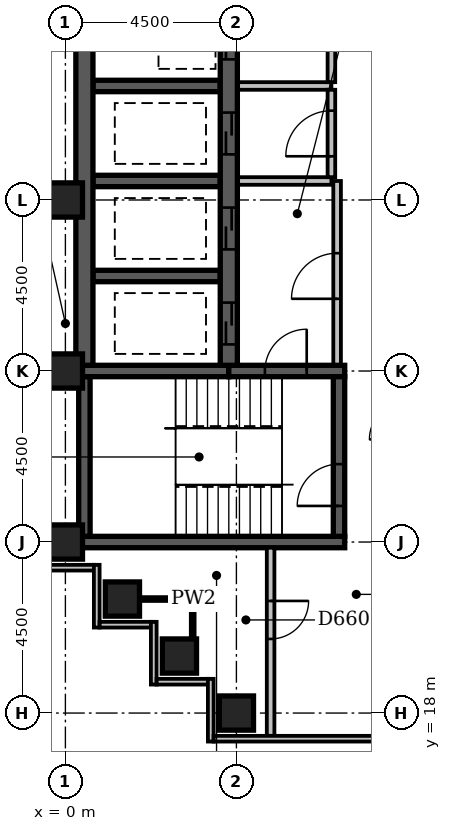
"""IFC4 building model, lengths in metres.
Left out: names, types, materials, properties, quantities, classifications, styles, units other than length and angle.
Written with IfcOpenShell. Run it as: python <this file> out.ifc"""

import sys

from ifc_helpers import new_model, si_unit, direction, frame, frame_2d, origin, origin_2d, place, context, subcontext, project, spatial, rectangle, extrude, element, fill, save


model = new_model("IFC4")
c1 = context("Model", 3, precision=1e-05, world=origin(), true_north=direction((0.0, 1.0)))
c2 = subcontext(c1, "Body", "Model", "MODEL_VIEW")
j1 = project(units=[si_unit("LENGTHUNIT", "METRE"), si_unit("PLANEANGLEUNIT", "RADIAN")], contexts=[c1])
p1 = place(None, origin())
s1 = spatial("IfcSite", under=j1, at=p1, CompositionType="ELEMENT")
p2 = place(p1, origin())
s2 = spatial("IfcBuilding", under=s1, at=p2, CompositionType="ELEMENT")
p3 = place(p2, frame((0.0, 0.0, 254.6)))
s3 = spatial("IfcBuildingStorey", under=s2, at=p3, CompositionType="ELEMENT", Elevation=254.6)
p4 = place(p3, frame((0.35, 22.5, -0.3), z_axis=(0.0, 0.0, 1.0), x_axis=(1.0, 0.0, 0.0)))
e1 = element("IfcWall", 1, at=p4, inside=s3, PredefinedType="SHEAR", context=c2, shape_type="SweptSolid", body=[
    extrude(rectangle(XDim=7.0, YDim=0.3, at=frame_2d((3.5, 0.0))), origin(), (0.0, 0.0, 1.0), 3.45),
])
p5 = place(p3, frame((0.35, 27.0, -0.3), z_axis=(0.0, 0.0, 1.0), x_axis=(1.0, 0.0, 0.0)))
e2 = element("IfcWall", 2, at=p5, inside=s3, PredefinedType="SHEAR", context=c2, shape_type="SweptSolid", body=[
    extrude(rectangle(XDim=3.95, YDim=0.3, at=frame_2d((1.975, 0.0))), origin(), (0.0, 0.0, 1.0), 3.45),
])
p6 = place(p3, frame((0.5, 22.65, -0.3), z_axis=(0.0, 0.0, 1.0), x_axis=(0.0, 1.0, 0.0)))
e3 = element("IfcWall", 3, at=p6, inside=s3, PredefinedType="SHEAR", context=c2, shape_type="SweptSolid", body=[
    extrude(rectangle(XDim=4.2, YDim=0.3, at=frame_2d((2.1, 0.0))), origin(), (0.0, 0.0, 1.0), 3.45),
])
p7 = place(p3, frame((0.5, 27.15, -0.3), z_axis=(0.0, 0.0, 1.0), x_axis=(0.0, 1.0, 0.0)))
e4 = element("IfcWall", 4, at=p7, inside=s3, PredefinedType="SHEAR", context=c2, shape_type="SweptSolid", body=[
    extrude(rectangle(XDim=22.125, YDim=0.45, at=frame_2d((11.062, 0.0))), origin(), (0.0, 0.0, 1.0), 3.45),
])
for number, where, z_axis, x_axis in (
    (5, (0.725, 29.5, -0.3), (0.0, 0.0, 1.0), (1.0, 0.0, 0.0)),
    (6, (0.725, 32.0, -0.3), (0.0, 0.0, 1.0), (1.0, 0.0, 0.0)),
    (7, (0.725, 34.5, -0.3), (0.0, 0.0, 1.0), (1.0, 0.0, 0.0)),
):
    element("IfcWall", number, at=place(p3, frame(where, z_axis=z_axis, x_axis=x_axis)), inside=s3, PredefinedType="SHEAR", context=c2, shape_type="SweptSolid", body=[
        extrude(rectangle(XDim=3.35, YDim=0.3, at=frame_2d((1.675, 0.0))), origin(), (0.0, 0.0, 1.0), 3.45),
    ])
p8 = place(p3, frame((4.3, 27.0, -0.3), z_axis=(0.0, 0.0, 1.0), x_axis=(1.0, 0.0, 0.0)))
e8 = element("IfcWall", 8, at=p8, inside=s3, PredefinedType="SHEAR", context=c2, shape_type="SweptSolid", body=[
    extrude(rectangle(XDim=3.05, YDim=0.3, at=frame_2d((1.525, 0.0))), origin(), (0.0, 0.0, 1.0), 3.45),
])
p9 = place(p8, frame((0.95, 0.0, 0.3)))
e9 = element("IfcOpeningElement", 9, at=p9, cuts=e8, PredefinedType="OPENING", context=c2, shape_type="SweptSolid", body=[
    extrude(rectangle(XDim=1.1, YDim=2.1, at=frame_2d((0.55, 1.05))), frame((0.0, 0.162, 0.0), z_axis=(0.0, -1.0, 0.0), x_axis=(1.0, 0.0, 0.0)), (0.0, 0.0, 1.0), 0.324),
])
p10 = place(p3, frame((4.3, 27.15, -0.3), z_axis=(0.0, 0.0, 1.0), x_axis=(0.0, 1.0, 0.0)))
e10 = element("IfcWall", 10, at=p10, inside=s3, PredefinedType="SHEAR", context=c2, shape_type="SweptSolid", body=[
    extrude(rectangle(XDim=22.125, YDim=0.45, at=frame_2d((11.062, 0.0))), origin(), (0.0, 0.0, 1.0), 3.45),
])
p11 = place(p10, frame((3.05, 0.0, 0.3)))
e11 = element("IfcOpeningElement", 11, at=p11, cuts=e10, PredefinedType="OPENING", context=c2, shape_type="SweptSolid", body=[
    extrude(rectangle(XDim=1.1, YDim=2.1, at=frame_2d((0.55, 1.05))), frame((0.0, 0.237, 0.0), z_axis=(0.0, -1.0, 0.0), x_axis=(1.0, 0.0, 0.0)), (0.0, 0.0, 1.0), 0.474),
])
p12 = place(p10, frame((0.55, 0.0, 0.3)))
e12 = element("IfcOpeningElement", 12, at=p12, cuts=e10, PredefinedType="OPENING", context=c2, shape_type="SweptSolid", body=[
    extrude(rectangle(XDim=1.1, YDim=2.1, at=frame_2d((0.55, 1.05))), frame((0.0, 0.237, 0.0), z_axis=(0.0, -1.0, 0.0), x_axis=(1.0, 0.0, 0.0)), (0.0, 0.0, 1.0), 0.474),
])
p13 = place(p10, frame((20.55, 0.0, 0.3)))
e13 = element("IfcOpeningElement", 13, at=p13, cuts=e10, PredefinedType="OPENING", context=c2, shape_type="SweptSolid", body=[
    extrude(rectangle(XDim=1.1, YDim=2.1, at=frame_2d((0.55, 1.05))), frame((0.0, 0.237, 0.0), z_axis=(0.0, -1.0, 0.0), x_axis=(1.0, 0.0, 0.0)), (0.0, 0.0, 1.0), 0.474),
])
p14 = place(p10, frame((18.05, 0.0, 0.3)))
e14 = element("IfcOpeningElement", 14, at=p14, cuts=e10, PredefinedType="OPENING", context=c2, shape_type="SweptSolid", body=[
    extrude(rectangle(XDim=1.1, YDim=2.1, at=frame_2d((0.55, 1.05))), frame((0.0, 0.237, 0.0), z_axis=(0.0, -1.0, 0.0), x_axis=(1.0, 0.0, 0.0)), (0.0, 0.0, 1.0), 0.474),
])
p15 = place(p10, frame((15.55, 0.0, 0.3)))
e15 = element("IfcOpeningElement", 15, at=p15, cuts=e10, PredefinedType="OPENING", context=c2, shape_type="SweptSolid", body=[
    extrude(rectangle(XDim=1.1, YDim=2.1, at=frame_2d((0.55, 1.05))), frame((0.0, 0.237, 0.0), z_axis=(0.0, -1.0, 0.0), x_axis=(1.0, 0.0, 0.0)), (0.0, 0.0, 1.0), 0.474),
])
p16 = place(p10, frame((13.05, 0.0, 0.3)))
e16 = element("IfcOpeningElement", 16, at=p16, cuts=e10, PredefinedType="OPENING", context=c2, shape_type="SweptSolid", body=[
    extrude(rectangle(XDim=1.1, YDim=2.1, at=frame_2d((0.55, 1.05))), frame((0.0, 0.237, 0.0), z_axis=(0.0, -1.0, 0.0), x_axis=(1.0, 0.0, 0.0)), (0.0, 0.0, 1.0), 0.474),
])
p17 = place(p10, frame((10.55, 0.0, 0.3)))
e17 = element("IfcOpeningElement", 17, at=p17, cuts=e10, PredefinedType="OPENING", context=c2, shape_type="SweptSolid", body=[
    extrude(rectangle(XDim=1.1, YDim=2.1, at=frame_2d((0.55, 1.05))), frame((0.0, 0.237, 0.0), z_axis=(0.0, -1.0, 0.0), x_axis=(1.0, 0.0, 0.0)), (0.0, 0.0, 1.0), 0.474),
])
p18 = place(p10, frame((8.05, 0.0, 0.3)))
e18 = element("IfcOpeningElement", 18, at=p18, cuts=e10, PredefinedType="OPENING", context=c2, shape_type="SweptSolid", body=[
    extrude(rectangle(XDim=1.1, YDim=2.1, at=frame_2d((0.55, 1.05))), frame((0.0, 0.237, 0.0), z_axis=(0.0, -1.0, 0.0), x_axis=(1.0, 0.0, 0.0)), (0.0, 0.0, 1.0), 0.474),
])
p19 = place(p10, frame((5.55, 0.0, 0.3)))
e19 = element("IfcOpeningElement", 19, at=p19, cuts=e10, PredefinedType="OPENING", context=c2, shape_type="SweptSolid", body=[
    extrude(rectangle(XDim=1.1, YDim=2.1, at=frame_2d((0.55, 1.05))), frame((0.0, 0.237, 0.0), z_axis=(0.0, -1.0, 0.0), x_axis=(1.0, 0.0, 0.0)), (0.0, 0.0, 1.0), 0.474),
])
p20 = place(p3, frame((7.2, 22.65, -0.3), z_axis=(0.0, 0.0, 1.0), x_axis=(0.0, 1.0, 0.0)))
e20 = element("IfcWall", 20, at=p20, inside=s3, PredefinedType="SHEAR", context=c2, shape_type="SweptSolid", body=[
    extrude(rectangle(XDim=4.2, YDim=0.3, at=frame_2d((2.1, 0.0))), origin(), (0.0, 0.0, 1.0), 3.45),
])
p21 = place(p20, frame((0.8, 0.0, 0.3)))
e21 = element("IfcOpeningElement", 21, at=p21, cuts=e20, PredefinedType="OPENING", context=c2, shape_type="SweptSolid", body=[
    extrude(rectangle(XDim=1.1, YDim=2.1, at=frame_2d((0.55, 1.05))), frame((0.0, 0.162, 0.0), z_axis=(0.0, -1.0, 0.0), x_axis=(1.0, 0.0, 0.0)), (0.0, 0.0, 1.0), 0.324),
])
for number, where, z_axis, x_axis in (
    (22, (4.5, 18.0, -0.3), (0.0, 0.0, 1.0), (1.0, 0.0, 0.0)),
    (23, (3.0, 19.5, -0.3), (0.0, 0.0, 1.0), (1.0, 0.0, 0.0)),
    (24, (1.5, 21.0, -0.3), (0.0, 0.0, 1.0), (1.0, 0.0, 0.0)),
    (25, (0.0, 22.5, -0.3), (0.0, 0.0, 1.0), (1.0, 0.0, 0.0)),
    (26, (0.0, 27.0, -0.3), (0.0, 0.0, 1.0), (1.0, 0.0, 0.0)),
    (27, (0.0, 31.5, -0.3), (0.0, 0.0, 1.0), (1.0, 0.0, 0.0)),
):
    element("IfcColumn", number, at=place(p3, frame(where, z_axis=z_axis, x_axis=x_axis)), inside=s3, PredefinedType="COLUMN", context=c2, shape_type="SweptSolid", body=[
        extrude(rectangle(XDim=0.9, YDim=0.9, at=origin_2d()), origin(), (0.0, 0.0, 1.0), 3.45),
    ])
p22 = place(p3, frame((-0.6, 21.825, 0.0), z_axis=(0.0, 0.0, 1.0), x_axis=(1.0, 0.0, 0.0)))
e28 = element("IfcWall", 28, at=p22, inside=s3, PredefinedType="STANDARD", context=c2, shape_type="SweptSolid", body=[
    extrude(rectangle(XDim=1.35, YDim=0.15, at=frame_2d((0.675, 0.0))), origin(), (0.0, 0.0, 1.0), 2.7),
])
p23 = place(p3, frame((0.825, 21.9, 0.0), z_axis=(0.0, 0.0, 1.0), x_axis=(0.0, -1.0, 0.0)))
e29 = element("IfcWall", 29, at=p23, inside=s3, PredefinedType="STANDARD", context=c2, shape_type="SweptSolid", body=[
    extrude(rectangle(XDim=1.65, YDim=0.15, at=frame_2d((0.825, 0.0))), origin(), (0.0, 0.0, 1.0), 2.7),
])
p24 = place(p3, frame((0.9, 20.325, 0.0), z_axis=(0.0, 0.0, 1.0), x_axis=(1.0, 0.0, 0.0)))
e30 = element("IfcWall", 30, at=p24, inside=s3, PredefinedType="STANDARD", context=c2, shape_type="SweptSolid", body=[
    extrude(rectangle(XDim=1.35, YDim=0.15, at=frame_2d((0.675, 0.0))), origin(), (0.0, 0.0, 1.0), 2.7),
])
p25 = place(p3, frame((2.325, 20.4, 0.0), z_axis=(0.0, 0.0, 1.0), x_axis=(0.0, -1.0, 0.0)))
e31 = element("IfcWall", 31, at=p25, inside=s3, PredefinedType="STANDARD", context=c2, shape_type="SweptSolid", body=[
    extrude(rectangle(XDim=1.65, YDim=0.15, at=frame_2d((0.825, 0.0))), origin(), (0.0, 0.0, 1.0), 2.7),
])
p26 = place(p3, frame((2.4, 18.825, 0.0), z_axis=(0.0, 0.0, 1.0), x_axis=(1.0, 0.0, 0.0)))
e32 = element("IfcWall", 32, at=p26, inside=s3, PredefinedType="STANDARD", context=c2, shape_type="SweptSolid", body=[
    extrude(rectangle(XDim=1.35, YDim=0.15, at=frame_2d((0.675, 0.0))), origin(), (0.0, 0.0, 1.0), 2.7),
])
p27 = place(p3, frame((3.825, 18.9, 0.0), z_axis=(0.0, 0.0, 1.0), x_axis=(0.0, -1.0, 0.0)))
e33 = element("IfcWall", 33, at=p27, inside=s3, PredefinedType="STANDARD", context=c2, shape_type="SweptSolid", body=[
    extrude(rectangle(XDim=1.65, YDim=0.15, at=frame_2d((0.825, 0.0))), origin(), (0.0, 0.0, 1.0), 2.7),
])
p28 = place(p3, frame((3.9, 17.325, 0.0), z_axis=(0.0, 0.0, 1.0), x_axis=(1.0, 0.0, 0.0)))
e34 = element("IfcWall", 34, at=p28, inside=s3, PredefinedType="STANDARD", context=c2, shape_type="SweptSolid", body=[
    extrude(rectangle(XDim=19.35, YDim=0.15, at=frame_2d((9.675, 0.0))), origin(), (0.0, 0.0, 1.0), 2.7),
])
p29 = place(p28, frame((6.15, 0.0, 0.6)))
e35 = element("IfcOpeningElement", 35, at=p29, cuts=e34, PredefinedType="OPENING", context=c2, shape_type="SweptSolid", body=[
    extrude(rectangle(XDim=2.4, YDim=1.8, at=frame_2d((1.2, 0.9))), frame((0.0, 0.087, 0.0), z_axis=(0.0, -1.0, 0.0), x_axis=(1.0, 0.0, 0.0)), (0.0, 0.0, 1.0), 0.174),
])
p30 = place(p28, frame((15.15, 0.0, 0.6)))
e36 = element("IfcOpeningElement", 36, at=p30, cuts=e34, PredefinedType="OPENING", context=c2, shape_type="SweptSolid", body=[
    extrude(rectangle(XDim=2.4, YDim=1.8, at=frame_2d((1.2, 0.9))), frame((0.0, 0.087, 0.0), z_axis=(0.0, -1.0, 0.0), x_axis=(1.0, 0.0, 0.0)), (0.0, 0.0, 1.0), 0.174),
])
p31 = place(p3, frame((4.545, 34.5, 0.0), z_axis=(0.0, 0.0, 1.0), x_axis=(1.0, 0.0, 0.0)))
e37 = element("IfcWall", 37, at=p31, inside=s3, PredefinedType="PARTITIONING", context=c2, shape_type="SweptSolid", body=[
    extrude(rectangle(XDim=2.455, YDim=0.2, at=frame_2d((1.228, 0.0))), origin(), (0.0, 0.0, 1.0), 3.15),
])
p32 = place(p3, frame((7.0, 34.6, 0.0), z_axis=(0.0, 0.0, 1.0), x_axis=(0.0, 1.0, 0.0)))
e38 = element("IfcWall", 38, at=p32, inside=s3, PredefinedType="PARTITIONING", context=c2, shape_type="SweptSolid", body=[
    extrude(rectangle(XDim=14.9, YDim=0.2, at=frame_2d((7.45, 0.0))), origin(), (0.0, 0.0, 1.0), 3.15),
])
p33 = place(p32, frame((2.8, 0.0, 0.0)))
e39 = element("IfcOpeningElement", 39, at=p33, cuts=e38, PredefinedType="OPENING", context=c2, shape_type="SweptSolid", body=[
    extrude(rectangle(XDim=1.2, YDim=2.1, at=frame_2d((0.6, 1.05))), frame((0.0, 0.112, 0.0), z_axis=(0.0, -1.0, 0.0), x_axis=(1.0, 0.0, 0.0)), (0.0, 0.0, 1.0), 0.224),
])
p34 = place(p32, frame((9.8, 0.0, 0.0)))
e40 = element("IfcOpeningElement", 40, at=p34, cuts=e38, PredefinedType="OPENING", context=c2, shape_type="SweptSolid", body=[
    extrude(rectangle(XDim=1.2, YDim=2.1, at=frame_2d((0.6, 1.05))), frame((0.0, 0.112, 0.0), z_axis=(0.0, -1.0, 0.0), x_axis=(1.0, 0.0, 0.0)), (0.0, 0.0, 1.0), 0.224),
])
p35 = place(p3, frame((4.545, 32.0, 0.0), z_axis=(0.0, 0.0, 1.0), x_axis=(1.0, 0.0, 0.0)))
e41 = element("IfcWall", 41, at=p35, inside=s3, PredefinedType="PARTITIONING", context=c2, shape_type="SweptSolid", body=[
    extrude(rectangle(XDim=2.455, YDim=0.2, at=frame_2d((1.228, 0.0))), origin(), (0.0, 0.0, 1.0), 3.15),
])
p36 = place(p3, frame((7.0, 32.1, 0.0), z_axis=(0.0, 0.0, 1.0), x_axis=(0.0, 1.0, 0.0)))
e42 = element("IfcWall", 42, at=p36, inside=s3, PredefinedType="PARTITIONING", context=c2, shape_type="SweptSolid", body=[
    extrude(rectangle(XDim=2.3, YDim=0.2, at=frame_2d((1.15, 0.0))), origin(), (0.0, 0.0, 1.0), 3.15),
])
p37 = place(p36, frame((0.55, 0.0, 0.0)))
e43 = element("IfcOpeningElement", 43, at=p37, cuts=e42, PredefinedType="OPENING", context=c2, shape_type="SweptSolid", body=[
    extrude(rectangle(XDim=1.2, YDim=2.1, at=frame_2d((0.6, 1.05))), frame((0.0, 0.112, 0.0), z_axis=(0.0, -1.0, 0.0), x_axis=(1.0, 0.0, 0.0)), (0.0, 0.0, 1.0), 0.224),
])
p38 = place(p3, frame((7.15, 27.17, 0.0), z_axis=(0.0, 0.0, 1.0), x_axis=(0.0, 1.0, 0.0)))
e44 = element("IfcWall", 44, at=p38, inside=s3, PredefinedType="PARTITIONING", context=c2, shape_type="SweptSolid", body=[
    extrude(rectangle(XDim=4.83, YDim=0.2, at=frame_2d((2.415, 0.0))), origin(), (0.0, 0.0, 1.0), 3.15),
])
p39 = place(p38, frame((1.73, 0.0, 0.0)))
e45 = element("IfcOpeningElement", 45, at=p39, cuts=e44, PredefinedType="OPENING", context=c2, shape_type="SweptSolid", body=[
    extrude(rectangle(XDim=1.2, YDim=2.1, at=frame_2d((0.6, 1.05))), frame((0.0, 0.112, 0.0), z_axis=(0.0, -1.0, 0.0), x_axis=(1.0, 0.0, 0.0)), (0.0, 0.0, 1.0), 0.224),
])
p40 = place(p3, frame((5.4, 17.4, 0.0), z_axis=(0.0, 0.0, 1.0), x_axis=(0.0, 1.0, 0.0)))
e46 = element("IfcWall", 46, at=p40, inside=s3, PredefinedType="PARTITIONING", context=c2, shape_type="SweptSolid", body=[
    extrude(rectangle(XDim=4.95, YDim=0.2, at=frame_2d((2.475, 0.0))), origin(), (0.0, 0.0, 1.0), 3.15),
])
p41 = place(p40, frame((2.55, 0.0, 0.0)))
e47 = element("IfcOpeningElement", 47, at=p41, cuts=e46, PredefinedType="OPENING", context=c2, shape_type="SweptSolid", body=[
    extrude(rectangle(XDim=1.0, YDim=2.1, at=frame_2d((0.5, 1.05))), frame((0.0, 0.112, 0.0), z_axis=(0.0, -1.0, 0.0), x_axis=(1.0, 0.0, 0.0)), (0.0, 0.0, 1.0), 0.224),
])
p42 = place(p3, frame((3.35, 19.95, 0.0), z_axis=(0.0, 0.0, 1.0), x_axis=(0.0, 1.0, 0.0)))
e48 = element("IfcWall", 48, at=p42, inside=s3, PredefinedType="PARTITIONING", context=c2, shape_type="SweptSolid", body=[
    extrude(rectangle(XDim=1.05, YDim=0.1, at=frame_2d((0.525, 0.0))), origin(), (0.0, 0.0, 1.0), 3.15),
])
p43 = place(p3, frame((1.95, 21.0, 0.0), z_axis=(0.0, 0.0, 1.0), x_axis=(1.0, 0.0, 0.0)))
e49 = element("IfcWall", 49, at=p43, inside=s3, PredefinedType="PARTITIONING", context=c2, shape_type="SweptSolid", body=[
    extrude(rectangle(XDim=1.65, YDim=0.1, at=frame_2d((0.825, 0.0))), origin(), (0.0, 0.0, 1.0), 3.15),
])
p44 = place(p39, origin())
e50 = element("IfcDoor", 50, at=p44, inside=s3, OperationType="SINGLE_SWING_LEFT", PredefinedType="DOOR", context=c2, shape_type="SweptSolid", body=[
    extrude(rectangle(XDim=1.2, YDim=2.1, at=frame_2d((0.6, 1.05))), frame((0.0, 0.025, 0.0), z_axis=(0.0, -1.0, 0.0), x_axis=(1.0, 0.0, 0.0)), (0.0, 0.0, 1.0), 0.05),
])
fill(e45, e50)
p45 = place(p11, origin())
e51 = element("IfcDoor", 51, at=p45, inside=s3, OperationType="SLIDING_TO_LEFT", PredefinedType="DOOR", context=c2, shape_type="SweptSolid", body=[
    extrude(rectangle(XDim=1.1, YDim=2.1, at=frame_2d((0.55, 1.05))), frame((0.0, 0.025, 0.0), z_axis=(0.0, -1.0, 0.0), x_axis=(1.0, 0.0, 0.0)), (0.0, 0.0, 1.0), 0.05),
])
fill(e11, e51)
p46 = place(p12, origin())
e52 = element("IfcDoor", 52, at=p46, inside=s3, OperationType="SLIDING_TO_LEFT", PredefinedType="DOOR", context=c2, shape_type="SweptSolid", body=[
    extrude(rectangle(XDim=1.1, YDim=2.1, at=frame_2d((0.55, 1.05))), frame((0.0, 0.025, 0.0), z_axis=(0.0, -1.0, 0.0), x_axis=(1.0, 0.0, 0.0)), (0.0, 0.0, 1.0), 0.05),
])
fill(e12, e52)
p47 = place(p18, origin())
e53 = element("IfcDoor", 53, at=p47, inside=s3, OperationType="SLIDING_TO_LEFT", PredefinedType="DOOR", context=c2, shape_type="SweptSolid", body=[
    extrude(rectangle(XDim=1.1, YDim=2.1, at=frame_2d((0.55, 1.05))), frame((0.0, 0.025, 0.0), z_axis=(0.0, -1.0, 0.0), x_axis=(1.0, 0.0, 0.0)), (0.0, 0.0, 1.0), 0.05),
])
fill(e18, e53)
p48 = place(p37, origin())
e54 = element("IfcDoor", 54, at=p48, inside=s3, OperationType="SINGLE_SWING_LEFT", PredefinedType="DOOR", context=c2, shape_type="SweptSolid", body=[
    extrude(rectangle(XDim=1.2, YDim=2.1, at=frame_2d((0.6, 1.05))), frame((0.0, 0.025, 0.0), z_axis=(0.0, -1.0, 0.0), x_axis=(1.0, 0.0, 0.0)), (0.0, 0.0, 1.0), 0.05),
])
fill(e43, e54)
p49 = place(p19, origin())
e55 = element("IfcDoor", 55, at=p49, inside=s3, OperationType="SLIDING_TO_LEFT", PredefinedType="DOOR", context=c2, shape_type="SweptSolid", body=[
    extrude(rectangle(XDim=1.1, YDim=2.1, at=frame_2d((0.55, 1.05))), frame((0.0, 0.025, 0.0), z_axis=(0.0, -1.0, 0.0), x_axis=(1.0, 0.0, 0.0)), (0.0, 0.0, 1.0), 0.05),
])
fill(e19, e55)
p50 = place(p9, frame((1.1, 0.0, 0.0), z_axis=(0.0, 0.0, 1.0), x_axis=(-1.0, 0.0, 0.0)))
e56 = element("IfcDoor", 56, at=p50, inside=s3, OperationType="SINGLE_SWING_LEFT", PredefinedType="DOOR", context=c2, shape_type="SweptSolid", body=[
    extrude(rectangle(XDim=1.1, YDim=2.1, at=frame_2d((0.55, 1.05))), frame((0.0, 0.025, 0.0), z_axis=(0.0, -1.0, 0.0), x_axis=(1.0, 0.0, 0.0)), (0.0, 0.0, 1.0), 0.05),
])
fill(e9, e56)
p51 = place(p21, origin())
e57 = element("IfcDoor", 57, at=p51, inside=s3, OperationType="SINGLE_SWING_LEFT", PredefinedType="DOOR", context=c2, shape_type="SweptSolid", body=[
    extrude(rectangle(XDim=1.1, YDim=2.1, at=frame_2d((0.55, 1.05))), frame((0.0, 0.025, 0.0), z_axis=(0.0, -1.0, 0.0), x_axis=(1.0, 0.0, 0.0)), (0.0, 0.0, 1.0), 0.05),
])
fill(e21, e57)
p52 = place(p41, origin())
e58 = element("IfcDoor", 58, at=p52, inside=s3, OperationType="SINGLE_SWING_RIGHT", PredefinedType="DOOR", context=c2, shape_type="SweptSolid", body=[
    extrude(rectangle(XDim=1.0, YDim=2.1, at=frame_2d((0.5, 1.05))), frame((0.0, 0.025, 0.0), z_axis=(0.0, -1.0, 0.0), x_axis=(1.0, 0.0, 0.0)), (0.0, 0.0, 1.0), 0.05),
])
fill(e47, e58)
save(model, sys.argv[1])
